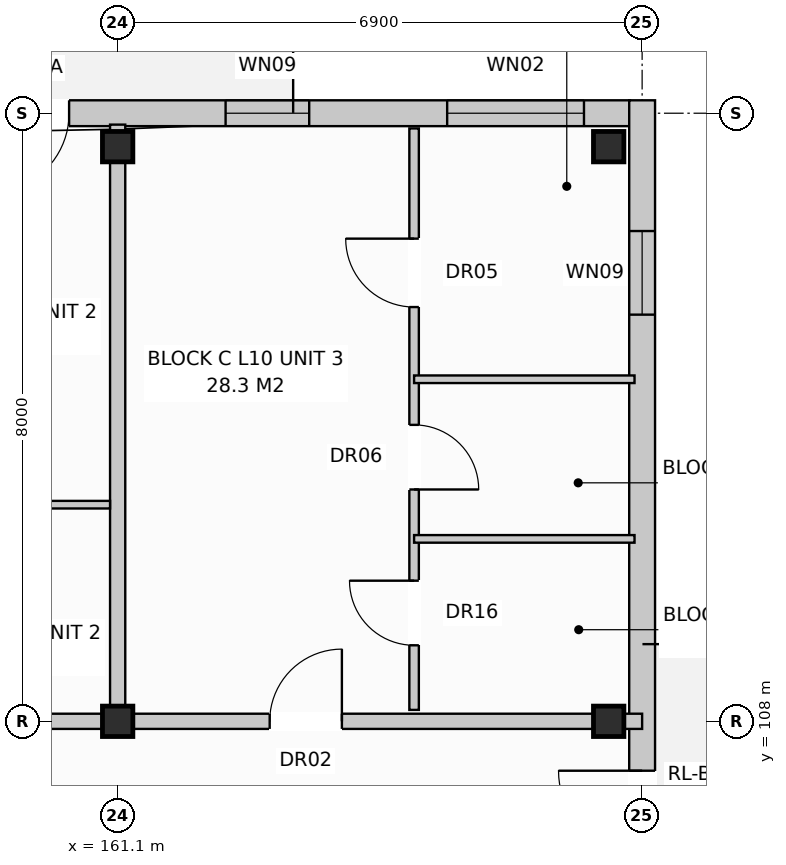
"""IFC4 building model, lengths in metres.
Left out: names, types, materials, properties, quantities, classifications, styles, units other than length and angle.
Written with IfcOpenShell. Run it as: python <this file> out.ifc"""

import sys

from ifc_helpers import new_model, si_unit, direction, frame, frame_2d, origin, origin_with_axes, origin_2d, place, context, subcontext, project, spatial, rectangle, extrude, element, fill, save


model = new_model("IFC4")
c1 = context("Model", 3, precision=1e-05, world=origin(), true_north=direction((0.0, 1.0)))
c2 = subcontext(c1, "Body", "Model", "MODEL_VIEW")
j1 = project(units=[si_unit("LENGTHUNIT", "METRE"), si_unit("PLANEANGLEUNIT", "RADIAN")], contexts=[c1])
p1 = place(None, origin())
s1 = spatial("IfcSite", under=j1, at=p1, CompositionType="ELEMENT")
p2 = place(p1, origin())
s2 = spatial("IfcBuilding", under=s1, at=p2, CompositionType="ELEMENT")
p3 = place(p2, frame((0.0, 0.0, 33.6)))
s3 = spatial("IfcBuildingStorey", under=s2, at=p3, CompositionType="ELEMENT", Elevation=33.6)
for number, where, z_axis, x_axis in (
    (1, (161.1, 108.0, 0.0), (0.0, 0.0, 1.0), (1.0, 0.0, 0.0)),
    (2, (161.1, 115.56, 0.0), (0.0, 0.0, 1.0), (1.0, 0.0, 0.0)),
    (3, (167.56, 108.0, 0.0), (0.0, 0.0, 1.0), (1.0, 0.0, 0.0)),
    (4, (167.56, 115.56, 0.0), (0.0, 0.0, 1.0), (1.0, 0.0, 0.0)),
):
    element("IfcColumn", number, at=place(p3, frame(where, z_axis=z_axis, x_axis=x_axis)), inside=s3, PredefinedType="COLUMN", context=c2, shape_type="SweptSolid", body=[
        extrude(rectangle(XDim=0.4, YDim=0.4, at=origin_2d()), origin(), (0.0, 0.0, 1.0), 3.2),
    ])
p4 = place(p3, frame((126.76, 116.0, 0.0), z_axis=(0.0, 0.0, 1.0), x_axis=(1.0, 0.0, 0.0)))
e5 = element("IfcWall", 5, at=p4, inside=s3, PredefinedType="STANDARD", context=c2, shape_type="SweptSolid", body=[
    extrude(rectangle(XDim=41.08, YDim=0.34, at=frame_2d((20.54, 0.0))), origin(), (0.0, 0.0, 1.0), 2.91),
])
p5 = place(p4, frame((7.36, 0.0, 0.0)))
e6 = element("IfcOpeningElement", 6, at=p5, cuts=e5, PredefinedType="OPENING", context=c2, shape_type="SweptSolid", body=[
    extrude(rectangle(XDim=1.05, YDim=2.12, at=frame_2d((0.525, 1.06))), frame((0.0, 0.182, 0.0), z_axis=(0.0, -1.0, 0.0), x_axis=(1.0, 0.0, 0.0)), (0.0, 0.0, 1.0), 0.364),
])
p6 = place(p4, frame((18.651, 0.0, 0.0)))
e7 = element("IfcOpeningElement", 7, at=p6, cuts=e5, PredefinedType="OPENING", context=c2, shape_type="SweptSolid", body=[
    extrude(rectangle(XDim=1.05, YDim=2.12, at=frame_2d((0.525, 1.06))), frame((0.0, 0.182, 0.0), z_axis=(0.0, -1.0, 0.0), x_axis=(1.0, 0.0, 0.0)), (0.0, 0.0, 1.0), 0.364),
])
p7 = place(p4, frame((32.651, 0.0, 0.0)))
e8 = element("IfcOpeningElement", 8, at=p7, cuts=e5, PredefinedType="OPENING", context=c2, shape_type="SweptSolid", body=[
    extrude(rectangle(XDim=1.05, YDim=2.12, at=frame_2d((0.525, 1.06))), frame((0.0, 0.182, 0.0), z_axis=(0.0, -1.0, 0.0), x_axis=(1.0, 0.0, 0.0)), (0.0, 0.0, 1.0), 0.364),
])
p8 = place(p4, frame((1.535, 0.0, 0.8)))
e9 = element("IfcOpeningElement", 9, at=p8, cuts=e5, PredefinedType="OPENING", context=c2, shape_type="SweptSolid", body=[
    extrude(rectangle(XDim=1.95, YDim=1.65, at=frame_2d((0.975, 0.825))), frame((0.0, 0.182, 0.0), z_axis=(0.0, -1.0, 0.0), x_axis=(1.0, 0.0, 0.0)), (0.0, 0.0, 1.0), 0.364),
])
p9 = place(p4, frame((10.51, 0.0, 0.8)))
e10 = element("IfcOpeningElement", 10, at=p9, cuts=e5, PredefinedType="OPENING", context=c2, shape_type="SweptSolid", body=[
    extrude(rectangle(XDim=1.8, YDim=1.7, at=frame_2d((0.9, 0.85))), frame((0.0, 0.182, 0.0), z_axis=(0.0, -1.0, 0.0), x_axis=(1.0, 0.0, 0.0)), (0.0, 0.0, 1.0), 0.364),
])
p10 = place(p4, frame((15.86, 0.0, 0.8)))
e11 = element("IfcOpeningElement", 11, at=p10, cuts=e5, PredefinedType="OPENING", context=c2, shape_type="SweptSolid", body=[
    extrude(rectangle(XDim=1.9, YDim=1.85, at=frame_2d((0.95, 0.925))), frame((0.0, 0.182, 0.0), z_axis=(0.0, -1.0, 0.0), x_axis=(1.0, 0.0, 0.0)), (0.0, 0.0, 1.0), 0.364),
])
p11 = place(p4, frame((21.96, 0.0, 0.72)))
e12 = element("IfcOpeningElement", 12, at=p11, cuts=e5, PredefinedType="OPENING", context=c2, shape_type="SweptSolid", body=[
    extrude(rectangle(XDim=1.1, YDim=1.5, at=frame_2d((0.55, 0.75))), frame((0.0, 0.182, 0.0), z_axis=(0.0, -1.0, 0.0), x_axis=(1.0, 0.0, 0.0)), (0.0, 0.0, 1.0), 0.364),
])
p12 = place(p4, frame((28.01, 0.0, 0.8)))
e13 = element("IfcOpeningElement", 13, at=p12, cuts=e5, PredefinedType="OPENING", context=c2, shape_type="SweptSolid", body=[
    extrude(rectangle(XDim=1.8, YDim=1.7, at=frame_2d((0.9, 0.85))), frame((0.0, 0.182, 0.0), z_axis=(0.0, -1.0, 0.0), x_axis=(1.0, 0.0, 0.0)), (0.0, 0.0, 1.0), 0.364),
])
p13 = place(p4, frame((30.81, 0.0, 0.85)))
e14 = element("IfcOpeningElement", 14, at=p13, cuts=e5, PredefinedType="OPENING", context=c2, shape_type="SweptSolid", body=[
    extrude(rectangle(XDim=1.5, YDim=1.65, at=frame_2d((0.75, 0.825))), frame((0.0, 0.182, 0.0), z_axis=(0.0, -1.0, 0.0), x_axis=(1.0, 0.0, 0.0)), (0.0, 0.0, 1.0), 0.364),
])
p14 = place(p4, frame((35.76, 0.0, 0.72)))
e15 = element("IfcOpeningElement", 15, at=p14, cuts=e5, PredefinedType="OPENING", context=c2, shape_type="SweptSolid", body=[
    extrude(rectangle(XDim=1.1, YDim=1.5, at=frame_2d((0.55, 0.75))), frame((0.0, 0.182, 0.0), z_axis=(0.0, -1.0, 0.0), x_axis=(1.0, 0.0, 0.0)), (0.0, 0.0, 1.0), 0.364),
])
p15 = place(p4, frame((38.675, 0.0, 0.8)))
e16 = element("IfcOpeningElement", 16, at=p15, cuts=e5, PredefinedType="OPENING", context=c2, shape_type="SweptSolid", body=[
    extrude(rectangle(XDim=1.8, YDim=1.7, at=frame_2d((0.9, 0.85))), frame((0.0, 0.182, 0.0), z_axis=(0.0, -1.0, 0.0), x_axis=(1.0, 0.0, 0.0)), (0.0, 0.0, 1.0), 0.364),
])
p16 = place(p3, frame((168.0, 97.43, 0.0), z_axis=(0.0, 0.0, 1.0), x_axis=(0.0, 1.0, 0.0)))
e17 = element("IfcWall", 17, at=p16, inside=s3, PredefinedType="STANDARD", context=c2, shape_type="SweptSolid", body=[
    extrude(rectangle(XDim=18.74, YDim=0.34, at=frame_2d((9.37, 0.0))), origin(), (0.0, 0.0, 1.0), 2.91),
])
p17 = place(p16, frame((8.82, 0.0, 0.0)))
e18 = element("IfcOpeningElement", 18, at=p17, cuts=e17, PredefinedType="OPENING", context=c2, shape_type="SweptSolid", body=[
    extrude(rectangle(XDim=1.1, YDim=2.1, at=frame_2d((0.55, 1.05))), frame((0.0, 0.182, 0.0), z_axis=(0.0, -1.0, 0.0), x_axis=(1.0, 0.0, 0.0)), (0.0, 0.0, 1.0), 0.364),
])
p18 = place(p16, frame((1.72, 0.0, 0.72)))
e19 = element("IfcOpeningElement", 19, at=p18, cuts=e17, PredefinedType="OPENING", context=c2, shape_type="SweptSolid", body=[
    extrude(rectangle(XDim=1.1, YDim=1.5, at=frame_2d((0.55, 0.75))), frame((0.0, 0.182, 0.0), z_axis=(0.0, -1.0, 0.0), x_axis=(1.0, 0.0, 0.0)), (0.0, 0.0, 1.0), 0.364),
])
p19 = place(p16, frame((15.92, 0.0, 0.72)))
e20 = element("IfcOpeningElement", 20, at=p19, cuts=e17, PredefinedType="OPENING", context=c2, shape_type="SweptSolid", body=[
    extrude(rectangle(XDim=1.1, YDim=1.5, at=frame_2d((0.55, 0.75))), frame((0.0, 0.182, 0.0), z_axis=(0.0, -1.0, 0.0), x_axis=(1.0, 0.0, 0.0)), (0.0, 0.0, 1.0), 0.364),
])
p20 = place(p3, frame((161.1, 108.15, 0.0), z_axis=(0.0, 0.0, 1.0), x_axis=(0.0, 1.0, 0.0)))
e21 = element("IfcWall", 21, at=p20, inside=s3, PredefinedType="PARTITIONING", context=c2, shape_type="SweptSolid", body=[
    extrude(rectangle(XDim=7.7, YDim=0.2, at=frame_2d((3.85, 0.0))), origin(), (0.0, 0.0, 1.0), 2.35),
])
p21 = place(p3, frame((140.4, 108.0, 0.0), z_axis=(0.0, 0.0, 1.0), x_axis=(1.0, 0.0, 0.0)))
e22 = element("IfcWall", 22, at=p21, inside=s3, PredefinedType="PARTITIONING", context=c2, shape_type="SweptSolid", body=[
    extrude(rectangle(XDim=20.7, YDim=0.2, at=frame_2d((10.35, 0.0))), origin(), (0.0, 0.0, 1.0), 2.35),
])
p22 = place(p21, frame((2.4, 0.0, 0.0)))
e23 = element("IfcOpeningElement", 23, at=p22, cuts=e22, PredefinedType="OPENING", context=c2, shape_type="SweptSolid", body=[
    extrude(rectangle(XDim=0.95, YDim=2.15, at=frame_2d((0.475, 1.075))), frame((0.0, 0.112, 0.0), z_axis=(0.0, -1.0, 0.0), x_axis=(1.0, 0.0, 0.0)), (0.0, 0.0, 1.0), 0.224),
])
p23 = place(p3, frame((146.7, 110.85, 0.0), z_axis=(0.0, 0.0, 1.0), x_axis=(1.0, 0.0, 0.0)))
e24 = element("IfcWall", 24, at=p23, inside=s3, PredefinedType="PARTITIONING", context=c2, shape_type="SweptSolid", body=[
    extrude(rectangle(XDim=14.3, YDim=0.1, at=frame_2d((7.15, 0.0))), origin(), (0.0, 0.0, 1.0), 2.96),
])
p24 = place(p23, frame((1.6, 0.0, 0.0)))
e25 = element("IfcOpeningElement", 25, at=p24, cuts=e24, PredefinedType="OPENING", context=c2, shape_type="SweptSolid", body=[
    extrude(rectangle(XDim=0.9, YDim=2.1, at=frame_2d((0.45, 1.05))), frame((0.0, 0.062, 0.0), z_axis=(0.0, -1.0, 0.0), x_axis=(1.0, 0.0, 0.0)), (0.0, 0.0, 1.0), 0.124),
])
p25 = place(p23, frame((5.1, 0.0, 0.0)))
e26 = element("IfcOpeningElement", 26, at=p25, cuts=e24, PredefinedType="OPENING", context=c2, shape_type="SweptSolid", body=[
    extrude(rectangle(XDim=0.85, YDim=2.05, at=frame_2d((0.425, 1.025))), frame((0.0, 0.062, 0.0), z_axis=(0.0, -1.0, 0.0), x_axis=(1.0, 0.0, 0.0)), (0.0, 0.0, 1.0), 0.124),
])
p26 = place(p23, frame((8.2, 0.0, 0.0)))
e27 = element("IfcOpeningElement", 27, at=p26, cuts=e24, PredefinedType="OPENING", context=c2, shape_type="SweptSolid", body=[
    extrude(rectangle(XDim=0.85, YDim=2.05, at=frame_2d((0.425, 1.025))), frame((0.0, 0.062, 0.0), z_axis=(0.0, -1.0, 0.0), x_axis=(1.0, 0.0, 0.0)), (0.0, 0.0, 1.0), 0.124),
])
p27 = place(p23, frame((11.6, 0.0, 0.0)))
e28 = element("IfcOpeningElement", 28, at=p27, cuts=e24, PredefinedType="OPENING", context=c2, shape_type="SweptSolid", body=[
    extrude(rectangle(XDim=0.85, YDim=2.05, at=frame_2d((0.425, 1.025))), frame((0.0, 0.062, 0.0), z_axis=(0.0, -1.0, 0.0), x_axis=(1.0, 0.0, 0.0)), (0.0, 0.0, 1.0), 0.124),
])
p28 = place(p3, frame((161.1, 108.0, 0.0), z_axis=(0.0, 0.0, 1.0), x_axis=(1.0, 0.0, 0.0)))
e29 = element("IfcWall", 29, at=p28, inside=s3, PredefinedType="PARTITIONING", context=c2, shape_type="SweptSolid", body=[
    extrude(rectangle(XDim=6.9, YDim=0.2, at=frame_2d((3.45, 0.0))), origin(), (0.0, 0.0, 1.0), 2.35),
])
p29 = place(p28, frame((2.0, 0.0, 0.0)))
e30 = element("IfcOpeningElement", 30, at=p29, cuts=e29, PredefinedType="OPENING", context=c2, shape_type="SweptSolid", body=[
    extrude(rectangle(XDim=0.95, YDim=2.15, at=frame_2d((0.475, 1.075))), frame((0.0, 0.112, 0.0), z_axis=(0.0, -1.0, 0.0), x_axis=(1.0, 0.0, 0.0)), (0.0, 0.0, 1.0), 0.224),
])
p30 = place(p3, frame((165.0, 108.15, 0.0), z_axis=(0.0, 0.0, 1.0), x_axis=(0.0, 1.0, 0.0)))
e31 = element("IfcWall", 31, at=p30, inside=s3, PredefinedType="PARTITIONING", context=c2, shape_type="SweptSolid", body=[
    extrude(rectangle(XDim=7.65, YDim=0.125, at=frame_2d((3.825, 0.0))), origin(), (0.0, 0.0, 1.0), 2.96),
])
p31 = place(p30, frame((0.85, 0.0, 0.0)))
e32 = element("IfcOpeningElement", 32, at=p31, cuts=e31, PredefinedType="OPENING", context=c2, shape_type="SweptSolid", body=[
    extrude(rectangle(XDim=0.85, YDim=2.1, at=frame_2d((0.425, 1.05))), frame((0.0, 0.074, 0.0), z_axis=(0.0, -1.0, 0.0), x_axis=(1.0, 0.0, 0.0)), (0.0, 0.0, 1.0), 0.149),
])
p32 = place(p30, frame((2.9, 0.0, 0.0)))
e33 = element("IfcOpeningElement", 33, at=p32, cuts=e31, PredefinedType="OPENING", context=c2, shape_type="SweptSolid", body=[
    extrude(rectangle(XDim=0.85, YDim=2.05, at=frame_2d((0.425, 1.025))), frame((0.0, 0.074, 0.0), z_axis=(0.0, -1.0, 0.0), x_axis=(1.0, 0.0, 0.0)), (0.0, 0.0, 1.0), 0.149),
])
p33 = place(p30, frame((5.3, 0.0, 0.0)))
e34 = element("IfcOpeningElement", 34, at=p33, cuts=e31, PredefinedType="OPENING", context=c2, shape_type="SweptSolid", body=[
    extrude(rectangle(XDim=0.9, YDim=2.1, at=frame_2d((0.45, 1.05))), frame((0.0, 0.074, 0.0), z_axis=(0.0, -1.0, 0.0), x_axis=(1.0, 0.0, 0.0)), (0.0, 0.0, 1.0), 0.149),
])
for number, where, z_axis, x_axis in (
    (35, (165.0, 110.4, 0.0), (0.0, 0.0, 1.0), (1.0, 0.0, 0.0)),
    (36, (165.0, 112.5, 0.0), (0.0, 0.0, 1.0), (1.0, 0.0, 0.0)),
):
    element("IfcWall", number, at=place(p3, frame(where, z_axis=z_axis, x_axis=x_axis)), inside=s3, PredefinedType="PARTITIONING", context=c2, shape_type="SweptSolid", body=[
        extrude(rectangle(XDim=2.9, YDim=0.1, at=frame_2d((1.45, 0.0))), origin(), (0.0, 0.0, 1.0), 2.96),
    ])
p34 = place(p7, frame((1.05, 0.0, 0.0), z_axis=(0.0, 0.0, 1.0), x_axis=(-1.0, 0.0, 0.0)))
e37 = element("IfcDoor", 37, at=p34, inside=s3, OperationType="SINGLE_SWING_LEFT", PredefinedType="DOOR", context=c2, shape_type="SweptSolid", body=[
    extrude(rectangle(XDim=1.05, YDim=2.12, at=frame_2d((0.525, 1.06))), frame((0.0, 0.025, 0.0), z_axis=(0.0, -1.0, 0.0), x_axis=(1.0, 0.0, 0.0)), (0.0, 0.0, 1.0), 0.05),
])
fill(e8, e37)
p35 = place(p14, origin_with_axes())
e38 = element("IfcWindow", 38, at=p35, inside=s3, PartitioningType="SINGLE_PANEL", PredefinedType="WINDOW", context=c2, shape_type="SweptSolid", body=[
    extrude(rectangle(XDim=1.1, YDim=1.5, at=frame_2d((0.55, 0.75))), frame((0.0, 0.03, 0.0), z_axis=(0.0, -1.0, 0.0), x_axis=(1.0, 0.0, 0.0)), (0.0, 0.0, 1.0), 0.06),
])
fill(e15, e38)
p36 = place(p15, origin_with_axes())
e39 = element("IfcWindow", 39, at=p36, inside=s3, PartitioningType="SINGLE_PANEL", PredefinedType="WINDOW", context=c2, shape_type="SweptSolid", body=[
    extrude(rectangle(XDim=1.8, YDim=1.7, at=frame_2d((0.9, 0.85))), frame((0.0, 0.03, 0.0), z_axis=(0.0, -1.0, 0.0), x_axis=(1.0, 0.0, 0.0)), (0.0, 0.0, 1.0), 0.06),
])
fill(e16, e39)
p37 = place(p17, origin_with_axes())
e40 = element("IfcDoor", 40, at=p37, inside=s3, OperationType="SINGLE_SWING_RIGHT", PredefinedType="DOOR", context=c2, shape_type="SweptSolid", body=[
    extrude(rectangle(XDim=1.1, YDim=2.1, at=frame_2d((0.55, 1.05))), frame((0.0, 0.025, 0.0), z_axis=(0.0, -1.0, 0.0), x_axis=(1.0, 0.0, 0.0)), (0.0, 0.0, 1.0), 0.05),
])
fill(e18, e40)
p38 = place(p19, origin_with_axes())
e41 = element("IfcWindow", 41, at=p38, inside=s3, PartitioningType="SINGLE_PANEL", PredefinedType="WINDOW", context=c2, shape_type="SweptSolid", body=[
    extrude(rectangle(XDim=1.1, YDim=1.5, at=frame_2d((0.55, 0.75))), frame((0.0, 0.03, 0.0), z_axis=(0.0, -1.0, 0.0), x_axis=(1.0, 0.0, 0.0)), (0.0, 0.0, 1.0), 0.06),
])
fill(e20, e41)
p39 = place(p29, origin_with_axes())
e42 = element("IfcDoor", 42, at=p39, inside=s3, OperationType="SINGLE_SWING_RIGHT", PredefinedType="DOOR", context=c2, shape_type="SweptSolid", body=[
    extrude(rectangle(XDim=0.95, YDim=2.15, at=frame_2d((0.475, 1.075))), frame((0.0, 0.025, 0.0), z_axis=(0.0, -1.0, 0.0), x_axis=(1.0, 0.0, 0.0)), (0.0, 0.0, 1.0), 0.05),
])
fill(e30, e42)
p40 = place(p31, origin_with_axes())
e43 = element("IfcDoor", 43, at=p40, inside=s3, OperationType="SINGLE_SWING_RIGHT", PredefinedType="DOOR", context=c2, shape_type="SweptSolid", body=[
    extrude(rectangle(XDim=0.85, YDim=2.1, at=frame_2d((0.425, 1.05))), frame((0.0, 0.025, 0.0), z_axis=(0.0, -1.0, 0.0), x_axis=(1.0, 0.0, 0.0)), (0.0, 0.0, 1.0), 0.05),
])
fill(e32, e43)
p41 = place(p32, frame((0.85, 0.0, 0.0), z_axis=(0.0, 0.0, 1.0), x_axis=(-1.0, 0.0, 0.0)))
e44 = element("IfcDoor", 44, at=p41, inside=s3, OperationType="SINGLE_SWING_LEFT", PredefinedType="DOOR", context=c2, shape_type="SweptSolid", body=[
    extrude(rectangle(XDim=0.85, YDim=2.05, at=frame_2d((0.425, 1.025))), frame((0.0, 0.025, 0.0), z_axis=(0.0, -1.0, 0.0), x_axis=(1.0, 0.0, 0.0)), (0.0, 0.0, 1.0), 0.05),
])
fill(e33, e44)
p42 = place(p33, origin_with_axes())
e45 = element("IfcDoor", 45, at=p42, inside=s3, OperationType="SINGLE_SWING_RIGHT", PredefinedType="DOOR", context=c2, shape_type="SweptSolid", body=[
    extrude(rectangle(XDim=0.9, YDim=2.1, at=frame_2d((0.45, 1.05))), frame((0.0, 0.025, 0.0), z_axis=(0.0, -1.0, 0.0), x_axis=(1.0, 0.0, 0.0)), (0.0, 0.0, 1.0), 0.05),
])
fill(e34, e45)
save(model, sys.argv[1])
